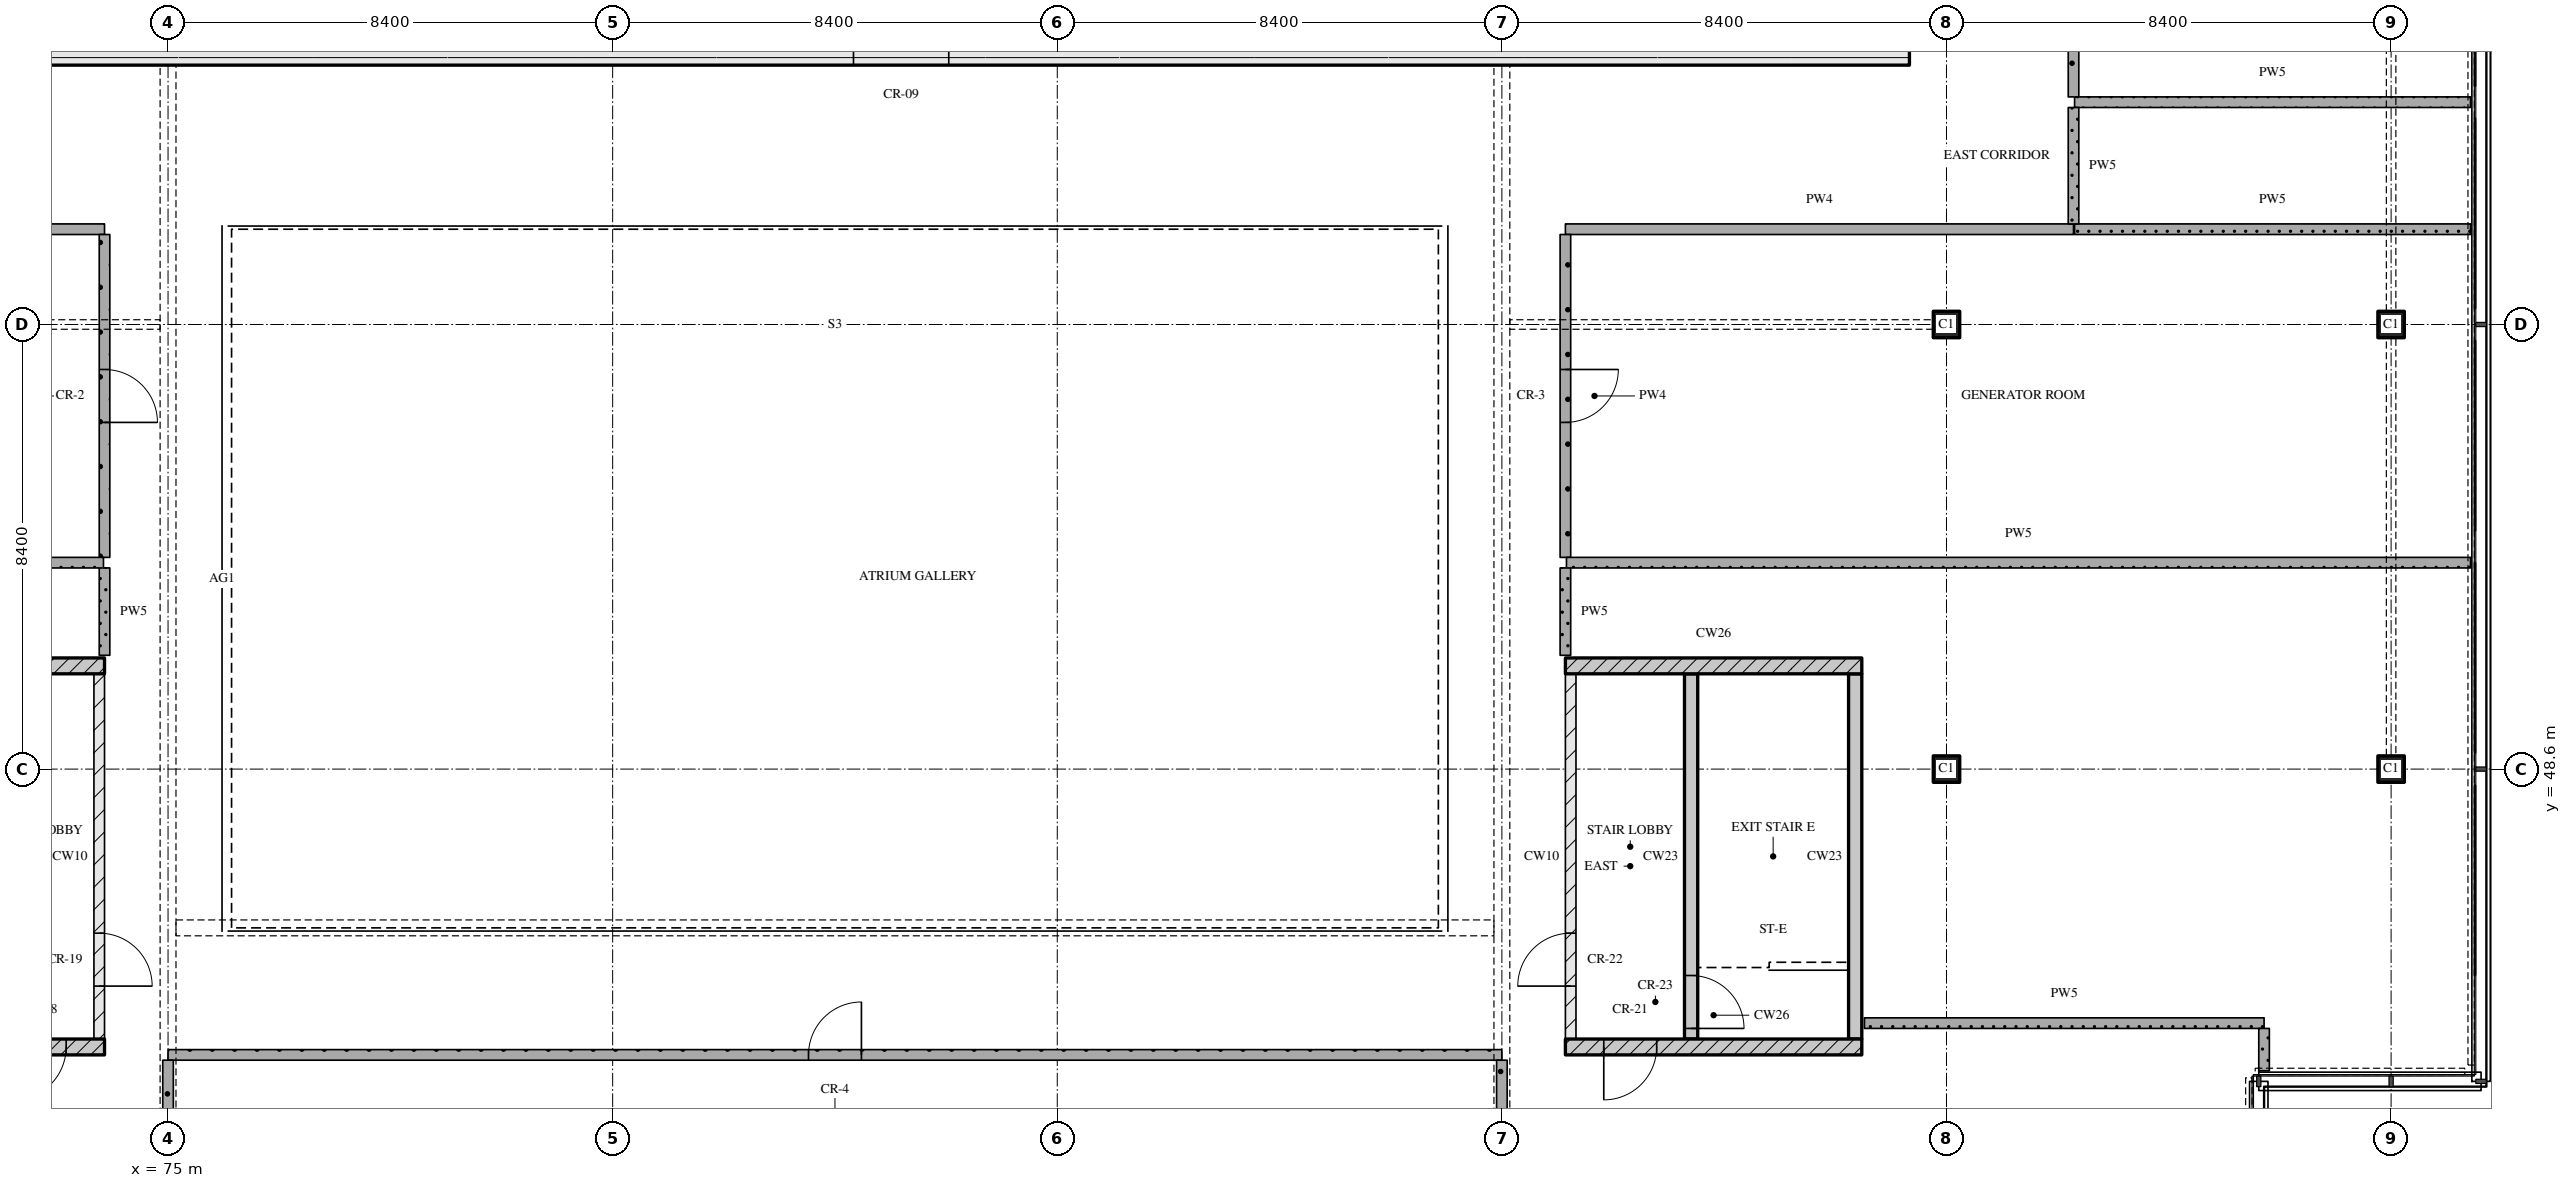
"""IFC4 building model, lengths in metres.
Left out: names, types, materials, properties, quantities, classifications, styles, units other than length and angle.
Written with IfcOpenShell. Run it as: python <this file> out.ifc"""

import sys

from ifc_helpers import new_model, si_unit, direction, frame, frame_2d, origin, origin_2d, place, context, subcontext, project, spatial, rectangle, extrude, element, fill, save


model = new_model("IFC4")
c1 = context("Model", 3, precision=1e-05, world=origin(), true_north=direction((0.0, 1.0)))
c2 = subcontext(c1, "Body", "Model", "MODEL_VIEW")
j1 = project(units=[si_unit("LENGTHUNIT", "METRE"), si_unit("PLANEANGLEUNIT", "RADIAN")], contexts=[c1])
p1 = place(None, origin())
s1 = spatial("IfcSite", under=j1, at=p1, CompositionType="ELEMENT")
p2 = place(p1, origin())
s2 = spatial("IfcBuilding", under=s1, at=p2, CompositionType="ELEMENT")
p3 = place(p2, frame((0.0, 0.0, 310.35)))
s3 = spatial("IfcBuildingStorey", under=s2, at=p3, CompositionType="ELEMENT", Elevation=310.35)
for number, where, z_axis, x_axis in (
    (1, (108.6, 48.6, 0.0), (0.0, 0.0, 1.0), (1.0, 0.0, 0.0)),
    (2, (108.6, 57.0, 0.0), (0.0, 0.0, 1.0), (1.0, 0.0, 0.0)),
    (3, (117.0, 48.6, 0.0), (0.0, 0.0, 1.0), (1.0, 0.0, 0.0)),
    (4, (117.0, 57.0, 0.0), (0.0, 0.0, 1.0), (1.0, 0.0, 0.0)),
):
    element("IfcColumn", number, at=place(p3, frame(where, z_axis=z_axis, x_axis=x_axis)), inside=s3, PredefinedType="COLUMN", context=c2, shape_type="SweptSolid", body=[
        extrude(rectangle(XDim=0.5, YDim=0.5, at=origin_2d()), origin(), (0.0, 0.0, 1.0), 4.5),
    ])
p4 = place(p3, frame((67.3, 62.15, 0.0), z_axis=(0.0, 0.0, 1.0), x_axis=(1.0, 0.0, 0.0)))
e5 = element("IfcWall", 5, at=p4, inside=s3, PredefinedType="SOLIDWALL", context=c2, shape_type="SweptSolid", body=[
    extrude(rectangle(XDim=40.6, YDim=0.5, at=frame_2d((20.3, 0.0))), origin(), (0.0, 0.0, 1.0), 4.2),
])
p5 = place(p4, frame((20.65, 0.0, 0.0)))
e6 = element("IfcOpeningElement", 6, at=p5, cuts=e5, PredefinedType="OPENING", context=c2, shape_type="SweptSolid", body=[
    extrude(rectangle(XDim=1.8, YDim=2.1, at=frame_2d((0.9, 1.05))), frame((0.0, 0.26, 0.0), z_axis=(0.0, -1.0, 0.0), x_axis=(1.0, 0.0, 0.0)), (0.0, 0.0, 1.0), 0.52),
])
p6 = place(p3, frame((68.2, 43.35, 0.0), z_axis=(0.0, 0.0, 1.0), x_axis=(1.0, 0.0, 0.0)))
e7 = element("IfcWall", 7, at=p6, inside=s3, PredefinedType="SOLIDWALL", context=c2, shape_type="SweptSolid", body=[
    extrude(rectangle(XDim=5.6, YDim=0.3, at=frame_2d((2.8, 0.0))), origin(), (0.0, 0.0, 1.0), 4.2),
])
p7 = place(p6, frame((3.875, 0.0, 0.0)))
e8 = element("IfcOpeningElement", 8, at=p7, cuts=e7, PredefinedType="OPENING", context=c2, shape_type="SweptSolid", body=[
    extrude(rectangle(XDim=1.0, YDim=2.1, at=frame_2d((0.5, 1.05))), frame((0.0, 0.16, 0.0), z_axis=(0.0, -1.0, 0.0), x_axis=(1.0, 0.0, 0.0)), (0.0, 0.0, 1.0), 0.32),
])
p8 = place(p3, frame((73.7, 43.5, 0.0), z_axis=(0.0, 0.0, 1.0), x_axis=(0.0, 1.0, 0.0)))
e9 = element("IfcWall", 9, at=p8, inside=s3, PredefinedType="PARTITIONING", context=c2, shape_type="SweptSolid", body=[
    extrude(rectangle(XDim=6.9, YDim=0.2, at=frame_2d((3.45, 0.0))), origin(), (0.0, 0.0, 1.0), 4.2),
])
p9 = place(p8, frame((1.0, 0.0, 0.0)))
e10 = element("IfcOpeningElement", 10, at=p9, cuts=e9, PredefinedType="OPENING", context=c2, shape_type="SweptSolid", body=[
    extrude(rectangle(XDim=1.0, YDim=2.1, at=frame_2d((0.5, 1.05))), frame((0.0, 0.11, 0.0), z_axis=(0.0, -1.0, 0.0), x_axis=(1.0, 0.0, 0.0)), (0.0, 0.0, 1.0), 0.22),
])
p10 = place(p3, frame((68.2, 50.55, 0.0), z_axis=(0.0, 0.0, 1.0), x_axis=(1.0, 0.0, 0.0)))
e11 = element("IfcWall", 11, at=p10, inside=s3, PredefinedType="SOLIDWALL", context=c2, shape_type="SweptSolid", body=[
    extrude(rectangle(XDim=5.6, YDim=0.3, at=frame_2d((2.8, 0.0))), origin(), (0.0, 0.0, 1.0), 4.2),
])
p11 = place(p3, frame((101.4, 43.35, 0.0), z_axis=(0.0, 0.0, 1.0), x_axis=(1.0, 0.0, 0.0)))
e12 = element("IfcWall", 12, at=p11, inside=s3, PredefinedType="SOLIDWALL", context=c2, shape_type="SweptSolid", body=[
    extrude(rectangle(XDim=5.6, YDim=0.3, at=frame_2d((2.8, 0.0))), origin(), (0.0, 0.0, 1.0), 4.2),
])
p12 = place(p11, frame((0.725, 0.0, 0.0)))
e13 = element("IfcOpeningElement", 13, at=p12, cuts=e12, PredefinedType="OPENING", context=c2, shape_type="SweptSolid", body=[
    extrude(rectangle(XDim=1.0, YDim=2.1, at=frame_2d((0.5, 1.05))), frame((0.0, 0.16, 0.0), z_axis=(0.0, -1.0, 0.0), x_axis=(1.0, 0.0, 0.0)), (0.0, 0.0, 1.0), 0.32),
])
p13 = place(p3, frame((101.5, 43.5, 0.0), z_axis=(0.0, 0.0, 1.0), x_axis=(0.0, 1.0, 0.0)))
e14 = element("IfcWall", 14, at=p13, inside=s3, PredefinedType="PARTITIONING", context=c2, shape_type="SweptSolid", body=[
    extrude(rectangle(XDim=6.9, YDim=0.2, at=frame_2d((3.45, 0.0))), origin(), (0.0, 0.0, 1.0), 4.2),
])
p14 = place(p13, frame((1.0, 0.0, 0.0)))
e15 = element("IfcOpeningElement", 15, at=p14, cuts=e14, PredefinedType="OPENING", context=c2, shape_type="SweptSolid", body=[
    extrude(rectangle(XDim=1.0, YDim=2.1, at=frame_2d((0.5, 1.05))), frame((0.0, 0.11, 0.0), z_axis=(0.0, -1.0, 0.0), x_axis=(1.0, 0.0, 0.0)), (0.0, 0.0, 1.0), 0.22),
])
p15 = place(p3, frame((103.775, 43.5, 0.0), z_axis=(0.0, 0.0, 1.0), x_axis=(0.0, 1.0, 0.0)))
e16 = element("IfcWall", 16, at=p15, inside=s3, PredefinedType="SOLIDWALL", context=c2, shape_type="SweptSolid", body=[
    extrude(rectangle(XDim=6.9, YDim=0.25, at=frame_2d((3.45, 0.0))), origin(), (0.0, 0.0, 1.0), 4.2),
])
p16 = place(p15, frame((0.2, 0.0, 0.0)))
e17 = element("IfcOpeningElement", 17, at=p16, cuts=e16, PredefinedType="OPENING", context=c2, shape_type="SweptSolid", body=[
    extrude(rectangle(XDim=1.0, YDim=2.1, at=frame_2d((0.5, 1.05))), frame((0.0, 0.135, 0.0), z_axis=(0.0, -1.0, 0.0), x_axis=(1.0, 0.0, 0.0)), (0.0, 0.0, 1.0), 0.27),
])
p17 = place(p3, frame((106.875, 43.5, 0.0), z_axis=(0.0, 0.0, 1.0), x_axis=(0.0, 1.0, 0.0)))
e18 = element("IfcWall", 18, at=p17, inside=s3, PredefinedType="SOLIDWALL", context=c2, shape_type="SweptSolid", body=[
    extrude(rectangle(XDim=6.9, YDim=0.25, at=frame_2d((3.45, 0.0))), origin(), (0.0, 0.0, 1.0), 4.2),
])
p18 = place(p3, frame((101.4, 50.55, 0.0), z_axis=(0.0, 0.0, 1.0), x_axis=(1.0, 0.0, 0.0)))
e19 = element("IfcWall", 19, at=p18, inside=s3, PredefinedType="SOLIDWALL", context=c2, shape_type="SweptSolid", body=[
    extrude(rectangle(XDim=5.6, YDim=0.3, at=frame_2d((2.8, 0.0))), origin(), (0.0, 0.0, 1.0), 4.2),
])
p19 = place(p3, frame((100.2, 43.2, 0.0), z_axis=(0.0, 0.0, 1.0), x_axis=(-1.0, 0.0, 0.0)))
e20 = element("IfcWall", 20, at=p19, inside=s3, PredefinedType="PARTITIONING", context=c2, shape_type="SweptSolid", body=[
    extrude(rectangle(XDim=25.2, YDim=0.2, at=frame_2d((12.6, 0.0))), origin(), (0.0, 0.0, 1.0), 4.2),
])
p20 = place(p19, frame((12.1, 0.0, 0.0)))
e21 = element("IfcOpeningElement", 21, at=p20, cuts=e20, PredefinedType="OPENING", context=c2, shape_type="SweptSolid", body=[
    extrude(rectangle(XDim=1.0, YDim=2.1, at=frame_2d((0.5, 1.05))), frame((0.0, 0.11, 0.0), z_axis=(0.0, -1.0, 0.0), x_axis=(1.0, 0.0, 0.0)), (0.0, 0.0, 1.0), 0.22),
])
p21 = place(p3, frame((107.05, 43.8, 0.0), z_axis=(0.0, 0.0, 1.0), x_axis=(1.0, 0.0, 0.0)))
e22 = element("IfcWall", 22, at=p21, inside=s3, PredefinedType="PARTITIONING", context=c2, shape_type="SweptSolid", body=[
    extrude(rectangle(XDim=7.55, YDim=0.2, at=frame_2d((3.775, 0.0))), origin(), (0.0, 0.0, 1.0), 4.2),
])
for number, where, z_axis, x_axis in (
    (23, (56.7, 52.5, 0.0), (0.0, 0.0, 1.0), (1.0, 0.0, 0.0)),
    (24, (101.42, 52.5, 0.0), (0.0, 0.0, 1.0), (1.0, 0.0, 0.0)),
):
    element("IfcWall", number, at=place(p3, frame(where, z_axis=z_axis, x_axis=x_axis)), inside=s3, PredefinedType="PARTITIONING", context=c2, shape_type="SweptSolid", body=[
        extrude(rectangle(XDim=17.08, YDim=0.2, at=frame_2d((8.54, 0.0))), origin(), (0.0, 0.0, 1.0), 4.2),
    ])
p22 = place(p3, frame((111.02, 58.8, 0.0), z_axis=(0.0, 0.0, 1.0), x_axis=(1.0, 0.0, 0.0)))
e25 = element("IfcWall", 25, at=p22, inside=s3, PredefinedType="PARTITIONING", context=c2, shape_type="SweptSolid", body=[
    extrude(rectangle(XDim=7.48, YDim=0.2, at=frame_2d((3.74, 0.0))), origin(), (0.0, 0.0, 1.0), 4.2),
])
for number, where, z_axis, x_axis in (
    (26, (64.2, 58.8, 0.0), (0.0, 0.0, 1.0), (1.0, 0.0, 0.0)),
    (27, (101.4, 58.8, 0.0), (0.0, 0.0, 1.0), (1.0, 0.0, 0.0)),
):
    element("IfcWall", number, at=place(p3, frame(where, z_axis=z_axis, x_axis=x_axis)), inside=s3, PredefinedType="PARTITIONING", context=c2, shape_type="SweptSolid", body=[
        extrude(rectangle(XDim=9.6, YDim=0.2, at=frame_2d((4.8, 0.0))), origin(), (0.0, 0.0, 1.0), 4.2),
    ])
p23 = place(p3, frame((111.02, 61.2, 0.0), z_axis=(0.0, 0.0, 1.0), x_axis=(1.0, 0.0, 0.0)))
e28 = element("IfcWall", 28, at=p23, inside=s3, PredefinedType="PARTITIONING", context=c2, shape_type="SweptSolid", body=[
    extrude(rectangle(XDim=7.48, YDim=0.2, at=frame_2d((3.74, 0.0))), origin(), (0.0, 0.0, 1.0), 4.2),
])
p24 = place(p3, frame((73.8, 52.4, 0.0), z_axis=(0.0, 0.0, 1.0), x_axis=(0.0, -1.0, 0.0)))
e29 = element("IfcWall", 29, at=p24, inside=s3, PredefinedType="PARTITIONING", context=c2, shape_type="SweptSolid", body=[
    extrude(rectangle(XDim=1.65, YDim=0.2, at=frame_2d((0.825, 0.0))), origin(), (0.0, 0.0, 1.0), 4.2),
])
p25 = place(p3, frame((73.8, 52.6, 0.0), z_axis=(0.0, 0.0, 1.0), x_axis=(0.0, 1.0, 0.0)))
e30 = element("IfcWall", 30, at=p25, inside=s3, PredefinedType="PARTITIONING", context=c2, shape_type="SweptSolid", body=[
    extrude(rectangle(XDim=6.1, YDim=0.2, at=frame_2d((3.05, 0.0))), origin(), (0.0, 0.0, 1.0), 4.2),
])
p26 = place(p25, frame((2.55, 0.0, 0.0)))
e31 = element("IfcOpeningElement", 31, at=p26, cuts=e30, PredefinedType="OPENING", context=c2, shape_type="SweptSolid", body=[
    extrude(rectangle(XDim=1.0, YDim=2.1, at=frame_2d((0.5, 1.05))), frame((0.0, 0.11, 0.0), z_axis=(0.0, -1.0, 0.0), x_axis=(1.0, 0.0, 0.0)), (0.0, 0.0, 1.0), 0.22),
])
for number, where, z_axis, x_axis in (
    (32, (75.0, 43.1, 0.0), (0.0, 0.0, 1.0), (0.0, -1.0, 0.0)),
    (33, (100.2, 43.1, 0.0), (0.0, 0.0, 1.0), (0.0, -1.0, 0.0)),
):
    element("IfcWall", number, at=place(p3, frame(where, z_axis=z_axis, x_axis=x_axis)), inside=s3, PredefinedType="PARTITIONING", context=c2, shape_type="SweptSolid", body=[
        extrude(rectangle(XDim=2.63, YDim=0.2, at=frame_2d((1.315, 0.0))), origin(), (0.0, 0.0, 1.0), 3.41),
    ])
p27 = place(p3, frame((101.4, 52.4, 0.0), z_axis=(0.0, 0.0, 1.0), x_axis=(0.0, -1.0, 0.0)))
e34 = element("IfcWall", 34, at=p27, inside=s3, PredefinedType="PARTITIONING", context=c2, shape_type="SweptSolid", body=[
    extrude(rectangle(XDim=1.65, YDim=0.2, at=frame_2d((0.825, 0.0))), origin(), (0.0, 0.0, 1.0), 4.2),
])
p28 = place(p3, frame((101.4, 58.7, 0.0), z_axis=(0.0, 0.0, 1.0), x_axis=(0.0, -1.0, 0.0)))
e35 = element("IfcWall", 35, at=p28, inside=s3, PredefinedType="PARTITIONING", context=c2, shape_type="SweptSolid", body=[
    extrude(rectangle(XDim=6.1, YDim=0.2, at=frame_2d((3.05, 0.0))), origin(), (0.0, 0.0, 1.0), 4.2),
])
p29 = place(p28, frame((2.55, 0.0, 0.0)))
e36 = element("IfcOpeningElement", 36, at=p29, cuts=e35, PredefinedType="OPENING", context=c2, shape_type="SweptSolid", body=[
    extrude(rectangle(XDim=1.0, YDim=2.1, at=frame_2d((0.5, 1.05))), frame((0.0, 0.11, 0.0), z_axis=(0.0, -1.0, 0.0), x_axis=(1.0, 0.0, 0.0)), (0.0, 0.0, 1.0), 0.22),
])
p30 = place(p3, frame((111.0, 61.1, 0.0), z_axis=(0.0, 0.0, 1.0), x_axis=(0.0, -1.0, 0.0)))
e37 = element("IfcWall", 37, at=p30, inside=s3, PredefinedType="PARTITIONING", context=c2, shape_type="SweptSolid", body=[
    extrude(rectangle(XDim=2.2, YDim=0.2, at=frame_2d((1.1, 0.0))), origin(), (0.0, 0.0, 1.0), 4.2),
])
p31 = place(p3, frame((111.0, 75.32, 0.0), z_axis=(0.0, 0.0, 1.0), x_axis=(0.0, -1.0, 0.0)))
e38 = element("IfcWall", 38, at=p31, inside=s3, PredefinedType="PARTITIONING", context=c2, shape_type="SweptSolid", body=[
    extrude(rectangle(XDim=14.02, YDim=0.2, at=frame_2d((7.01, 0.0))), origin(), (0.0, 0.0, 1.0), 4.2),
])
p32 = place(p31, frame((7.37, 0.0, 0.0)))
e39 = element("IfcOpeningElement", 39, at=p32, cuts=e38, PredefinedType="OPENING", context=c2, shape_type="SweptSolid", body=[
    extrude(rectangle(XDim=1.0, YDim=2.1, at=frame_2d((0.5, 1.05))), frame((0.0, 0.11, 0.0), z_axis=(0.0, -1.0, 0.0), x_axis=(1.0, 0.0, 0.0)), (0.0, 0.0, 1.0), 0.22),
])
p33 = place(p3, frame((114.6, 43.7, 0.0), z_axis=(0.0, 0.0, 1.0), x_axis=(0.0, -1.0, 0.0)))
e40 = element("IfcWall", 40, at=p33, inside=s3, PredefinedType="PARTITIONING", context=c2, shape_type="SweptSolid", body=[
    extrude(rectangle(XDim=0.8, YDim=0.2, at=frame_2d((0.4, 0.0))), origin(), (0.0, 0.0, 1.0), 4.2),
])
p34 = place(p5, origin())
e41 = element("IfcDoor", 41, at=p34, inside=s3, OperationType="DOUBLE_DOOR_SINGLE_SWING", PredefinedType="DOOR", context=c2, shape_type="SweptSolid", body=[
    extrude(rectangle(XDim=1.8, YDim=2.1, at=frame_2d((0.9, 1.05))), frame((0.0, 0.025, 0.0), z_axis=(0.0, -1.0, 0.0), x_axis=(1.0, 0.0, 0.0)), (0.0, 0.0, 1.0), 0.05),
])
fill(e6, e41)
p35 = place(p7, origin())
e42 = element("IfcDoor", 42, at=p35, inside=s3, OperationType="SINGLE_SWING_RIGHT", PredefinedType="DOOR", context=c2, shape_type="SweptSolid", body=[
    extrude(rectangle(XDim=1.0, YDim=2.1, at=frame_2d((0.5, 1.05))), frame((0.0, 0.025, 0.0), z_axis=(0.0, -1.0, 0.0), x_axis=(1.0, 0.0, 0.0)), (0.0, 0.0, 1.0), 0.05),
])
fill(e8, e42)
p36 = place(p9, origin())
e43 = element("IfcDoor", 43, at=p36, inside=s3, OperationType="SINGLE_SWING_RIGHT", PredefinedType="DOOR", context=c2, shape_type="SweptSolid", body=[
    extrude(rectangle(XDim=1.0, YDim=2.1, at=frame_2d((0.5, 1.05))), frame((0.0, 0.025, 0.0), z_axis=(0.0, -1.0, 0.0), x_axis=(1.0, 0.0, 0.0)), (0.0, 0.0, 1.0), 0.05),
])
fill(e10, e43)
p37 = place(p12, origin())
e44 = element("IfcDoor", 44, at=p37, inside=s3, OperationType="SINGLE_SWING_RIGHT", PredefinedType="DOOR", context=c2, shape_type="SweptSolid", body=[
    extrude(rectangle(XDim=1.0, YDim=2.1, at=frame_2d((0.5, 1.05))), frame((0.0, 0.025, 0.0), z_axis=(0.0, -1.0, 0.0), x_axis=(1.0, 0.0, 0.0)), (0.0, 0.0, 1.0), 0.05),
])
fill(e13, e44)
p38 = place(p16, origin())
e45 = element("IfcDoor", 45, at=p38, inside=s3, OperationType="SINGLE_SWING_RIGHT", PredefinedType="DOOR", context=c2, shape_type="SweptSolid", body=[
    extrude(rectangle(XDim=1.0, YDim=2.1, at=frame_2d((0.5, 1.05))), frame((0.0, 0.025, 0.0), z_axis=(0.0, -1.0, 0.0), x_axis=(1.0, 0.0, 0.0)), (0.0, 0.0, 1.0), 0.05),
])
fill(e17, e45)
p39 = place(p14, origin())
e46 = element("IfcDoor", 46, at=p39, inside=s3, OperationType="SINGLE_SWING_LEFT", PredefinedType="DOOR", context=c2, shape_type="SweptSolid", body=[
    extrude(rectangle(XDim=1.0, YDim=2.1, at=frame_2d((0.5, 1.05))), frame((0.0, 0.025, 0.0), z_axis=(0.0, -1.0, 0.0), x_axis=(1.0, 0.0, 0.0)), (0.0, 0.0, 1.0), 0.05),
])
fill(e15, e46)
p40 = place(p20, origin())
e47 = element("IfcDoor", 47, at=p40, inside=s3, OperationType="SINGLE_SWING_RIGHT", PredefinedType="DOOR", context=c2, shape_type="SweptSolid", body=[
    extrude(rectangle(XDim=1.0, YDim=2.1, at=frame_2d((0.5, 1.05))), frame((0.0, 0.025, 0.0), z_axis=(0.0, -1.0, 0.0), x_axis=(1.0, 0.0, 0.0)), (0.0, 0.0, 1.0), 0.05),
])
fill(e21, e47)
p41 = place(p26, origin())
e48 = element("IfcDoor", 48, at=p41, inside=s3, OperationType="SINGLE_SWING_RIGHT", PredefinedType="DOOR", context=c2, shape_type="SweptSolid", body=[
    extrude(rectangle(XDim=1.0, YDim=2.1, at=frame_2d((0.5, 1.05))), frame((0.0, 0.025, 0.0), z_axis=(0.0, -1.0, 0.0), x_axis=(1.0, 0.0, 0.0)), (0.0, 0.0, 1.0), 0.05),
])
fill(e31, e48)
p42 = place(p29, origin())
e49 = element("IfcDoor", 49, at=p42, inside=s3, OperationType="SINGLE_SWING_LEFT", PredefinedType="DOOR", context=c2, shape_type="SweptSolid", body=[
    extrude(rectangle(XDim=1.0, YDim=2.1, at=frame_2d((0.5, 1.05))), frame((0.0, 0.025, 0.0), z_axis=(0.0, -1.0, 0.0), x_axis=(1.0, 0.0, 0.0)), (0.0, 0.0, 1.0), 0.05),
])
fill(e36, e49)
save(model, sys.argv[1])
